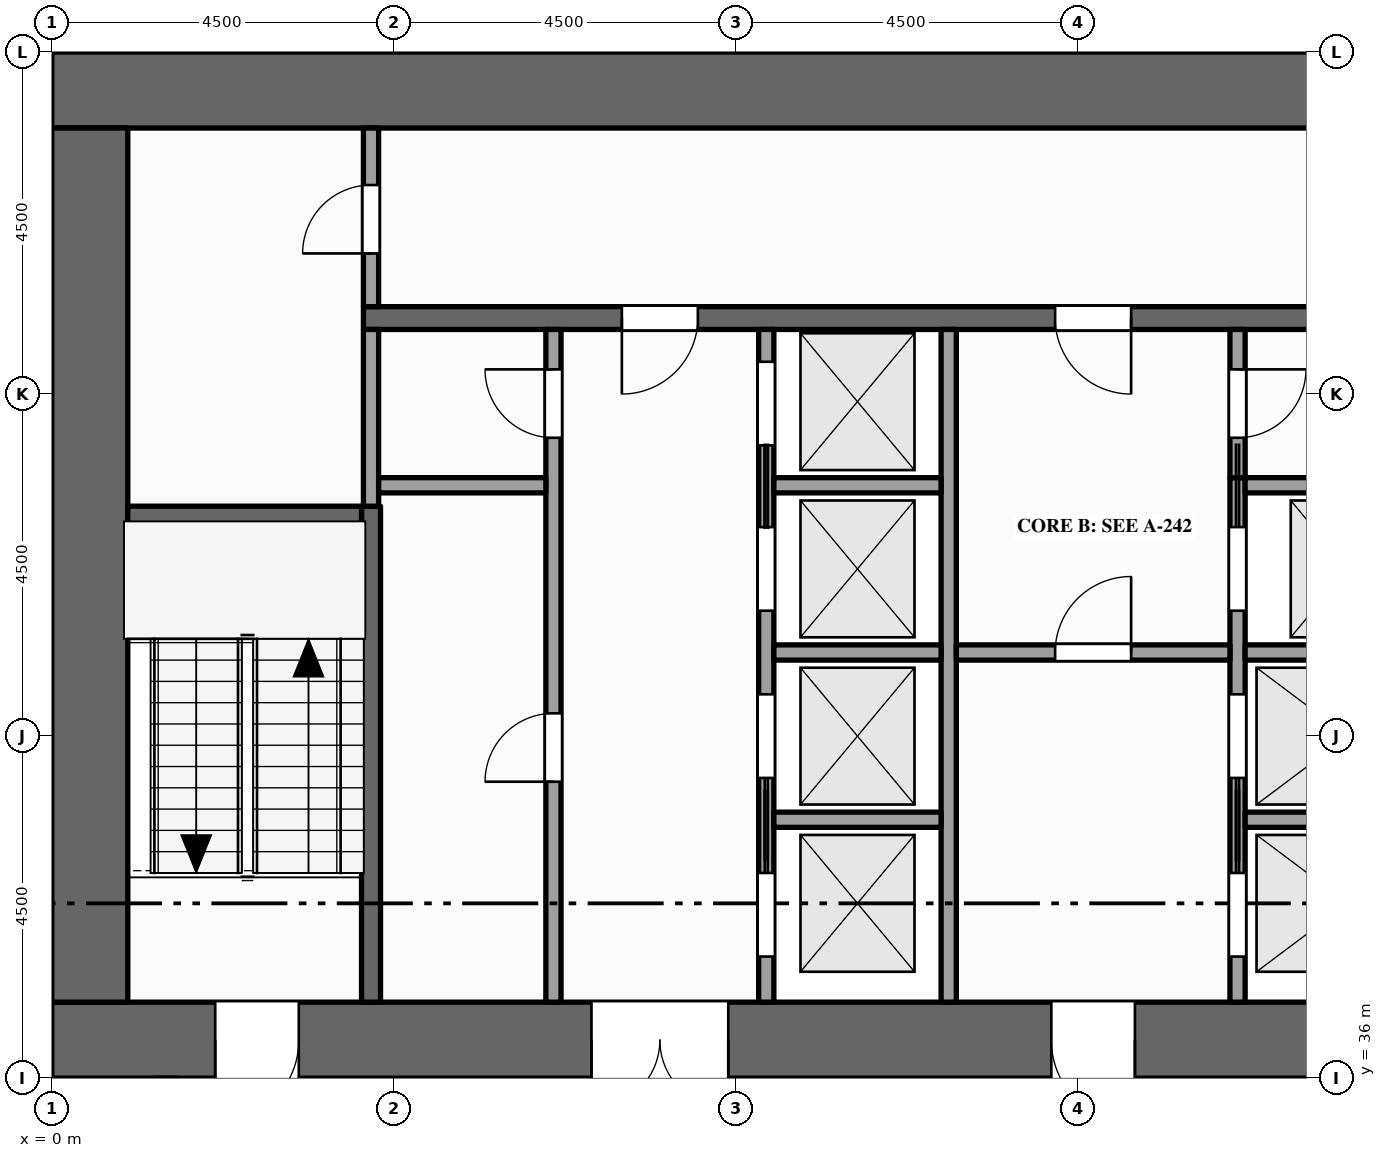
"""IFC4 building model, lengths in metres.
Left out: names, types, materials, properties, quantities, classifications, styles, units other than length and angle.
Written with IfcOpenShell. Run it as: python <this file> out.ifc"""

import sys

from ifc_helpers import new_model, si_unit, direction, frame, frame_2d, origin, place, context, subcontext, project, spatial, rectangle, extrude, element, fill, save


model = new_model("IFC4")
c1 = context("Model", 3, precision=1e-05, world=origin(), true_north=direction((0.0, 1.0)))
c2 = subcontext(c1, "Body", "Model", "MODEL_VIEW")
j1 = project(units=[si_unit("LENGTHUNIT", "METRE"), si_unit("PLANEANGLEUNIT", "RADIAN")], contexts=[c1])
p1 = place(None, origin())
s1 = spatial("IfcSite", under=j1, at=p1, CompositionType="ELEMENT")
p2 = place(p1, origin())
s2 = spatial("IfcBuilding", under=s1, at=p2, CompositionType="ELEMENT")
p3 = place(p2, frame((0.0, 0.0, 235.0)))
s3 = spatial("IfcBuildingStorey", under=s2, at=p3, CompositionType="ELEMENT", Elevation=235.0)
p4 = place(p3, frame((0.0, 36.5, -0.15), z_axis=(0.0, 0.0, 1.0), x_axis=(1.0, 0.0, 0.0)))
e1 = element("IfcWall", 1, at=p4, inside=s3, PredefinedType="SHEAR", context=c2, shape_type="SweptSolid", body=[
    extrude(rectangle(XDim=22.5, YDim=1.0, at=frame_2d((11.25, 0.0))), origin(), (0.0, 0.0, 1.0), 4.0),
])
p5 = place(p4, frame((7.1, 0.0, 0.15)))
e2 = element("IfcOpeningElement", 2, at=p5, cuts=e1, PredefinedType="OPENING", context=c2, shape_type="SweptSolid", body=[
    extrude(rectangle(XDim=1.8, YDim=2.1, at=frame_2d((0.9, 1.05))), frame((0.0, 0.51, 0.0), z_axis=(0.0, -1.0, 0.0), x_axis=(1.0, 0.0, 0.0)), (0.0, 0.0, 1.0), 1.02),
])
p6 = place(p4, frame((13.15, 0.0, 0.15)))
e3 = element("IfcOpeningElement", 3, at=p6, cuts=e1, PredefinedType="OPENING", context=c2, shape_type="SweptSolid", body=[
    extrude(rectangle(XDim=1.1, YDim=2.1, at=frame_2d((0.55, 1.05))), frame((0.0, 0.51, 0.0), z_axis=(0.0, -1.0, 0.0), x_axis=(1.0, 0.0, 0.0)), (0.0, 0.0, 1.0), 1.02),
])
p7 = place(p4, frame((2.15, 0.0, 0.15)))
e4 = element("IfcOpeningElement", 4, at=p7, cuts=e1, PredefinedType="OPENING", context=c2, shape_type="SweptSolid", body=[
    extrude(rectangle(XDim=1.1, YDim=2.1, at=frame_2d((0.55, 1.05))), frame((0.0, 0.51, 0.0), z_axis=(0.0, -1.0, 0.0), x_axis=(1.0, 0.0, 0.0)), (0.0, 0.0, 1.0), 1.02),
])
p8 = place(p4, frame((19.35, 0.0, 0.15)))
e5 = element("IfcOpeningElement", 5, at=p8, cuts=e1, PredefinedType="OPENING", context=c2, shape_type="SweptSolid", body=[
    extrude(rectangle(XDim=1.1, YDim=2.1, at=frame_2d((0.55, 1.05))), frame((0.0, 0.51, 0.0), z_axis=(0.0, -1.0, 0.0), x_axis=(1.0, 0.0, 0.0)), (0.0, 0.0, 1.0), 1.02),
])
p9 = place(p3, frame((0.0, 49.0, -0.15), z_axis=(0.0, 0.0, 1.0), x_axis=(1.0, 0.0, 0.0)))
e6 = element("IfcWall", 6, at=p9, inside=s3, PredefinedType="SHEAR", context=c2, shape_type="SweptSolid", body=[
    extrude(rectangle(XDim=22.5, YDim=1.0, at=frame_2d((11.25, 0.0))), origin(), (0.0, 0.0, 1.0), 4.0),
])
p10 = place(p3, frame((0.5, 37.0, -0.15), z_axis=(0.0, 0.0, 1.0), x_axis=(0.0, 1.0, 0.0)))
e7 = element("IfcWall", 7, at=p10, inside=s3, PredefinedType="SHEAR", context=c2, shape_type="SweptSolid", body=[
    extrude(rectangle(XDim=11.5, YDim=1.0, at=frame_2d((5.75, 0.0))), origin(), (0.0, 0.0, 1.0), 4.0),
])
p11 = place(p3, frame((4.2, 37.0, 0.0), z_axis=(0.0, 0.0, 1.0), x_axis=(0.0, 1.0, 0.0)))
e8 = element("IfcWall", 8, at=p11, inside=s3, PredefinedType="SHEAR", context=c2, shape_type="SweptSolid", body=[
    extrude(rectangle(XDim=6.525, YDim=0.25, at=frame_2d((3.262, 0.0))), origin(), (0.0, 0.0, 1.0), 3.85),
])
p12 = place(p3, frame((4.2, 43.525, 0.0), z_axis=(0.0, 0.0, 1.0), x_axis=(0.0, 1.0, 0.0)))
e9 = element("IfcWall", 9, at=p12, inside=s3, PredefinedType="PARTITIONING", context=c2, shape_type="SweptSolid", body=[
    extrude(rectangle(XDim=2.325, YDim=0.2, at=frame_2d((1.163, 0.0))), origin(), (0.0, 0.0, 1.0), 3.85),
])
p13 = place(p3, frame((4.2, 46.15, 0.0), z_axis=(0.0, 0.0, 1.0), x_axis=(0.0, 1.0, 0.0)))
e10 = element("IfcWall", 10, at=p13, inside=s3, PredefinedType="PARTITIONING", context=c2, shape_type="SweptSolid", body=[
    extrude(rectangle(XDim=2.35, YDim=0.2, at=frame_2d((1.175, 0.0))), origin(), (0.0, 0.0, 1.0), 3.85),
])
p14 = place(p13, frame((0.7, 0.0, 0.0)))
e11 = element("IfcOpeningElement", 11, at=p14, cuts=e10, PredefinedType="OPENING", context=c2, shape_type="SweptSolid", body=[
    extrude(rectangle(XDim=0.9, YDim=2.1, at=frame_2d((0.45, 1.05))), frame((0.0, 0.11, 0.0), z_axis=(0.0, -1.0, 0.0), x_axis=(1.0, 0.0, 0.0)), (0.0, 0.0, 1.0), 0.22),
])
p15 = place(p3, frame((6.6, 37.0, 0.0), z_axis=(0.0, 0.0, 1.0), x_axis=(0.0, 1.0, 0.0)))
e12 = element("IfcWall", 12, at=p15, inside=s3, PredefinedType="PARTITIONING", context=c2, shape_type="SweptSolid", body=[
    extrude(rectangle(XDim=8.85, YDim=0.2, at=frame_2d((4.425, 0.0))), origin(), (0.0, 0.0, 1.0), 3.85),
])
p16 = place(p15, frame((2.9, 0.0, 0.0)))
e13 = element("IfcOpeningElement", 13, at=p16, cuts=e12, PredefinedType="OPENING", context=c2, shape_type="SweptSolid", body=[
    extrude(rectangle(XDim=0.9, YDim=2.1, at=frame_2d((0.45, 1.05))), frame((0.0, 0.11, 0.0), z_axis=(0.0, -1.0, 0.0), x_axis=(1.0, 0.0, 0.0)), (0.0, 0.0, 1.0), 0.22),
])
p17 = place(p15, frame((7.425, 0.0, 0.0)))
e14 = element("IfcOpeningElement", 14, at=p17, cuts=e12, PredefinedType="OPENING", context=c2, shape_type="SweptSolid", body=[
    extrude(rectangle(XDim=0.9, YDim=2.1, at=frame_2d((0.45, 1.05))), frame((0.0, 0.11, 0.0), z_axis=(0.0, -1.0, 0.0), x_axis=(1.0, 0.0, 0.0)), (0.0, 0.0, 1.0), 0.22),
])
p18 = place(p3, frame((9.4, 37.0, 0.0), z_axis=(0.0, 0.0, 1.0), x_axis=(0.0, 1.0, 0.0)))
e15 = element("IfcWall", 15, at=p18, inside=s3, PredefinedType="SOLIDWALL", context=c2, shape_type="SweptSolid", body=[
    extrude(rectangle(XDim=8.85, YDim=0.2, at=frame_2d((4.425, 0.0))), origin(), (0.0, 0.0, 1.0), 3.85),
])
p19 = place(p18, frame((0.6, 0.0, 0.012)))
e16 = element("IfcOpeningElement", 16, at=p19, cuts=e15, PredefinedType="OPENING", context=c2, shape_type="SweptSolid", body=[
    extrude(rectangle(XDim=1.1, YDim=2.1, at=frame_2d((0.55, 1.05))), frame((0.0, 0.11, 0.0), z_axis=(0.0, -1.0, 0.0), x_axis=(1.0, 0.0, 0.0)), (0.0, 0.0, 1.0), 0.22),
])
p20 = place(p18, frame((2.95, 0.0, 0.012)))
e17 = element("IfcOpeningElement", 17, at=p20, cuts=e15, PredefinedType="OPENING", context=c2, shape_type="SweptSolid", body=[
    extrude(rectangle(XDim=1.1, YDim=2.1, at=frame_2d((0.55, 1.05))), frame((0.0, 0.11, 0.0), z_axis=(0.0, -1.0, 0.0), x_axis=(1.0, 0.0, 0.0)), (0.0, 0.0, 1.0), 0.22),
])
p21 = place(p18, frame((5.15, 0.0, 0.012)))
e18 = element("IfcOpeningElement", 18, at=p21, cuts=e15, PredefinedType="OPENING", context=c2, shape_type="SweptSolid", body=[
    extrude(rectangle(XDim=1.1, YDim=2.1, at=frame_2d((0.55, 1.05))), frame((0.0, 0.11, 0.0), z_axis=(0.0, -1.0, 0.0), x_axis=(1.0, 0.0, 0.0)), (0.0, 0.0, 1.0), 0.22),
])
p22 = place(p18, frame((7.325, 0.0, 0.012)))
e19 = element("IfcOpeningElement", 19, at=p22, cuts=e15, PredefinedType="OPENING", context=c2, shape_type="SweptSolid", body=[
    extrude(rectangle(XDim=1.1, YDim=2.1, at=frame_2d((0.55, 1.05))), frame((0.0, 0.11, 0.0), z_axis=(0.0, -1.0, 0.0), x_axis=(1.0, 0.0, 0.0)), (0.0, 0.0, 1.0), 0.22),
])
p23 = place(p3, frame((11.8, 37.0, 0.0), z_axis=(0.0, 0.0, 1.0), x_axis=(0.0, 1.0, 0.0)))
e20 = element("IfcWall", 20, at=p23, inside=s3, PredefinedType="SOLIDWALL", context=c2, shape_type="SweptSolid", body=[
    extrude(rectangle(XDim=8.85, YDim=0.2, at=frame_2d((4.425, 0.0))), origin(), (0.0, 0.0, 1.0), 3.85),
])
p24 = place(p3, frame((15.6, 37.0, 0.0), z_axis=(0.0, 0.0, 1.0), x_axis=(0.0, 1.0, 0.0)))
e21 = element("IfcWall", 21, at=p24, inside=s3, PredefinedType="SOLIDWALL", context=c2, shape_type="SweptSolid", body=[
    extrude(rectangle(XDim=6.9, YDim=0.2, at=frame_2d((3.45, 0.0))), origin(), (0.0, 0.0, 1.0), 3.85),
])
p25 = place(p24, frame((0.6, 0.0, 0.012)))
e22 = element("IfcOpeningElement", 22, at=p25, cuts=e21, PredefinedType="OPENING", context=c2, shape_type="SweptSolid", body=[
    extrude(rectangle(XDim=1.1, YDim=2.1, at=frame_2d((0.55, 1.05))), frame((0.0, 0.11, 0.0), z_axis=(0.0, -1.0, 0.0), x_axis=(1.0, 0.0, 0.0)), (0.0, 0.0, 1.0), 0.22),
])
p26 = place(p24, frame((2.95, 0.0, 0.012)))
e23 = element("IfcOpeningElement", 23, at=p26, cuts=e21, PredefinedType="OPENING", context=c2, shape_type="SweptSolid", body=[
    extrude(rectangle(XDim=1.1, YDim=2.1, at=frame_2d((0.55, 1.05))), frame((0.0, 0.11, 0.0), z_axis=(0.0, -1.0, 0.0), x_axis=(1.0, 0.0, 0.0)), (0.0, 0.0, 1.0), 0.22),
])
p27 = place(p24, frame((5.15, 0.0, 0.012)))
e24 = element("IfcOpeningElement", 24, at=p27, cuts=e21, PredefinedType="OPENING", context=c2, shape_type="SweptSolid", body=[
    extrude(rectangle(XDim=1.1, YDim=2.1, at=frame_2d((0.55, 1.05))), frame((0.0, 0.11, 0.0), z_axis=(0.0, -1.0, 0.0), x_axis=(1.0, 0.0, 0.0)), (0.0, 0.0, 1.0), 0.22),
])
p28 = place(p3, frame((15.6, 43.9, 0.0), z_axis=(0.0, 0.0, 1.0), x_axis=(0.0, 1.0, 0.0)))
e25 = element("IfcWall", 25, at=p28, inside=s3, PredefinedType="PARTITIONING", context=c2, shape_type="SweptSolid", body=[
    extrude(rectangle(XDim=1.95, YDim=0.2, at=frame_2d((0.975, 0.0))), origin(), (0.0, 0.0, 1.0), 3.85),
])
p29 = place(p28, frame((0.525, 0.0, 0.0)))
e26 = element("IfcOpeningElement", 26, at=p29, cuts=e25, PredefinedType="OPENING", context=c2, shape_type="SweptSolid", body=[
    extrude(rectangle(XDim=0.9, YDim=2.1, at=frame_2d((0.45, 1.05))), frame((0.0, 0.11, 0.0), z_axis=(0.0, -1.0, 0.0), x_axis=(1.0, 0.0, 0.0)), (0.0, 0.0, 1.0), 0.22),
])
p30 = place(p3, frame((9.5, 39.4, 0.0), z_axis=(0.0, 0.0, 1.0), x_axis=(1.0, 0.0, 0.0)))
e27 = element("IfcWall", 27, at=p30, inside=s3, PredefinedType="SOLIDWALL", context=c2, shape_type="SweptSolid", body=[
    extrude(rectangle(XDim=2.2, YDim=0.2, at=frame_2d((1.1, 0.0))), origin(), (0.0, 0.0, 1.0), 3.85),
])
p31 = place(p3, frame((15.7, 39.4, 0.0), z_axis=(0.0, 0.0, 1.0), x_axis=(1.0, 0.0, 0.0)))
e28 = element("IfcWall", 28, at=p31, inside=s3, PredefinedType="SOLIDWALL", context=c2, shape_type="SweptSolid", body=[
    extrude(rectangle(XDim=2.675, YDim=0.2, at=frame_2d((1.337, 0.0))), origin(), (0.0, 0.0, 1.0), 3.85),
])
p32 = place(p3, frame((9.5, 41.6, 0.0), z_axis=(0.0, 0.0, 1.0), x_axis=(1.0, 0.0, 0.0)))
e29 = element("IfcWall", 29, at=p32, inside=s3, PredefinedType="SOLIDWALL", context=c2, shape_type="SweptSolid", body=[
    extrude(rectangle(XDim=2.2, YDim=0.2, at=frame_2d((1.1, 0.0))), origin(), (0.0, 0.0, 1.0), 3.85),
])
p33 = place(p3, frame((11.9, 41.6, 0.0), z_axis=(0.0, 0.0, 1.0), x_axis=(1.0, 0.0, 0.0)))
e30 = element("IfcWall", 30, at=p33, inside=s3, PredefinedType="PARTITIONING", context=c2, shape_type="SweptSolid", body=[
    extrude(rectangle(XDim=3.6, YDim=0.2, at=frame_2d((1.8, 0.0))), origin(), (0.0, 0.0, 1.0), 3.85),
])
p34 = place(p33, frame((1.3, 0.0, 0.0)))
e31 = element("IfcOpeningElement", 31, at=p34, cuts=e30, PredefinedType="OPENING", context=c2, shape_type="SweptSolid", body=[
    extrude(rectangle(XDim=1.0, YDim=2.1, at=frame_2d((0.5, 1.05))), frame((0.0, 0.11, 0.0), z_axis=(0.0, -1.0, 0.0), x_axis=(1.0, 0.0, 0.0)), (0.0, 0.0, 1.0), 0.22),
])
p35 = place(p3, frame((15.7, 41.6, 0.0), z_axis=(0.0, 0.0, 1.0), x_axis=(1.0, 0.0, 0.0)))
e32 = element("IfcWall", 32, at=p35, inside=s3, PredefinedType="SOLIDWALL", context=c2, shape_type="SweptSolid", body=[
    extrude(rectangle(XDim=2.675, YDim=0.2, at=frame_2d((1.337, 0.0))), origin(), (0.0, 0.0, 1.0), 3.85),
])
p36 = place(p3, frame((1.0, 43.4, 0.0), z_axis=(0.0, 0.0, 1.0), x_axis=(1.0, 0.0, 0.0)))
e33 = element("IfcWall", 33, at=p36, inside=s3, PredefinedType="SHEAR", context=c2, shape_type="SweptSolid", body=[
    extrude(rectangle(XDim=3.075, YDim=0.25, at=frame_2d((1.538, 0.0))), origin(), (0.0, 0.0, 1.0), 3.85),
])
p37 = place(p3, frame((4.3, 43.8, 0.0), z_axis=(0.0, 0.0, 1.0), x_axis=(1.0, 0.0, 0.0)))
e34 = element("IfcWall", 34, at=p37, inside=s3, PredefinedType="PARTITIONING", context=c2, shape_type="SweptSolid", body=[
    extrude(rectangle(XDim=2.2, YDim=0.2, at=frame_2d((1.1, 0.0))), origin(), (0.0, 0.0, 1.0), 3.85),
])
p38 = place(p3, frame((9.5, 43.8, 0.0), z_axis=(0.0, 0.0, 1.0), x_axis=(1.0, 0.0, 0.0)))
e35 = element("IfcWall", 35, at=p38, inside=s3, PredefinedType="SOLIDWALL", context=c2, shape_type="SweptSolid", body=[
    extrude(rectangle(XDim=2.2, YDim=0.2, at=frame_2d((1.1, 0.0))), origin(), (0.0, 0.0, 1.0), 3.85),
])
p39 = place(p3, frame((15.7, 43.8, 0.0), z_axis=(0.0, 0.0, 1.0), x_axis=(1.0, 0.0, 0.0)))
e36 = element("IfcWall", 36, at=p39, inside=s3, PredefinedType="SOLIDWALL", context=c2, shape_type="SweptSolid", body=[
    extrude(rectangle(XDim=2.7, YDim=0.2, at=frame_2d((1.35, 0.0))), origin(), (0.0, 0.0, 1.0), 3.85),
])
p40 = place(p3, frame((4.1, 46.0, 0.0), z_axis=(0.0, 0.0, 1.0), x_axis=(1.0, 0.0, 0.0)))
e37 = element("IfcWall", 37, at=p40, inside=s3, PredefinedType="SHEAR", context=c2, shape_type="SweptSolid", body=[
    extrude(rectangle(XDim=14.5, YDim=0.3, at=frame_2d((7.25, 0.0))), origin(), (0.0, 0.0, 1.0), 3.85),
])
p41 = place(p40, frame((3.4, 0.0, 0.0)))
e38 = element("IfcOpeningElement", 38, at=p41, cuts=e37, PredefinedType="OPENING", context=c2, shape_type="SweptSolid", body=[
    extrude(rectangle(XDim=1.0, YDim=2.1, at=frame_2d((0.5, 1.05))), frame((0.0, 0.16, 0.0), z_axis=(0.0, -1.0, 0.0), x_axis=(1.0, 0.0, 0.0)), (0.0, 0.0, 1.0), 0.32),
])
p42 = place(p40, frame((9.1, 0.0, 0.0)))
e39 = element("IfcOpeningElement", 39, at=p42, cuts=e37, PredefinedType="OPENING", context=c2, shape_type="SweptSolid", body=[
    extrude(rectangle(XDim=1.0, YDim=2.1, at=frame_2d((0.5, 1.05))), frame((0.0, 0.16, 0.0), z_axis=(0.0, -1.0, 0.0), x_axis=(1.0, 0.0, 0.0)), (0.0, 0.0, 1.0), 0.32),
])
p43 = place(p19, origin())
e40 = element("IfcDoor", 40, at=p43, inside=s3, OperationType="SLIDING_TO_RIGHT", PredefinedType="DOOR", context=c2, shape_type="SweptSolid", body=[
    extrude(rectangle(XDim=1.1, YDim=2.1, at=frame_2d((0.55, 1.05))), frame((0.0, 0.025, 0.0), z_axis=(0.0, -1.0, 0.0), x_axis=(1.0, 0.0, 0.0)), (0.0, 0.0, 1.0), 0.05),
])
fill(e16, e40)
p44 = place(p20, origin())
e41 = element("IfcDoor", 41, at=p44, inside=s3, OperationType="SLIDING_TO_LEFT", PredefinedType="DOOR", context=c2, shape_type="SweptSolid", body=[
    extrude(rectangle(XDim=1.1, YDim=2.1, at=frame_2d((0.55, 1.05))), frame((0.0, 0.025, 0.0), z_axis=(0.0, -1.0, 0.0), x_axis=(1.0, 0.0, 0.0)), (0.0, 0.0, 1.0), 0.05),
])
fill(e17, e41)
p45 = place(p21, origin())
e42 = element("IfcDoor", 42, at=p45, inside=s3, OperationType="SLIDING_TO_RIGHT", PredefinedType="DOOR", context=c2, shape_type="SweptSolid", body=[
    extrude(rectangle(XDim=1.1, YDim=2.1, at=frame_2d((0.55, 1.05))), frame((0.0, 0.025, 0.0), z_axis=(0.0, -1.0, 0.0), x_axis=(1.0, 0.0, 0.0)), (0.0, 0.0, 1.0), 0.05),
])
fill(e18, e42)
p46 = place(p22, origin())
e43 = element("IfcDoor", 43, at=p46, inside=s3, OperationType="SLIDING_TO_LEFT", PredefinedType="DOOR", context=c2, shape_type="SweptSolid", body=[
    extrude(rectangle(XDim=1.1, YDim=2.1, at=frame_2d((0.55, 1.05))), frame((0.0, 0.025, 0.0), z_axis=(0.0, -1.0, 0.0), x_axis=(1.0, 0.0, 0.0)), (0.0, 0.0, 1.0), 0.05),
])
fill(e19, e43)
p47 = place(p25, origin())
e44 = element("IfcDoor", 44, at=p47, inside=s3, OperationType="SLIDING_TO_RIGHT", PredefinedType="DOOR", context=c2, shape_type="SweptSolid", body=[
    extrude(rectangle(XDim=1.1, YDim=2.1, at=frame_2d((0.55, 1.05))), frame((0.0, 0.025, 0.0), z_axis=(0.0, -1.0, 0.0), x_axis=(1.0, 0.0, 0.0)), (0.0, 0.0, 1.0), 0.05),
])
fill(e22, e44)
p48 = place(p26, origin())
e45 = element("IfcDoor", 45, at=p48, inside=s3, OperationType="SLIDING_TO_LEFT", PredefinedType="DOOR", context=c2, shape_type="SweptSolid", body=[
    extrude(rectangle(XDim=1.1, YDim=2.1, at=frame_2d((0.55, 1.05))), frame((0.0, 0.025, 0.0), z_axis=(0.0, -1.0, 0.0), x_axis=(1.0, 0.0, 0.0)), (0.0, 0.0, 1.0), 0.05),
])
fill(e23, e45)
p49 = place(p27, origin())
e46 = element("IfcDoor", 46, at=p49, inside=s3, OperationType="SLIDING_TO_RIGHT", PredefinedType="DOOR", context=c2, shape_type="SweptSolid", body=[
    extrude(rectangle(XDim=1.1, YDim=2.1, at=frame_2d((0.55, 1.05))), frame((0.0, 0.025, 0.0), z_axis=(0.0, -1.0, 0.0), x_axis=(1.0, 0.0, 0.0)), (0.0, 0.0, 1.0), 0.05),
])
fill(e24, e46)
p50 = place(p5, origin())
e47 = element("IfcDoor", 47, at=p50, inside=s3, OperationType="DOUBLE_DOOR_SINGLE_SWING", PredefinedType="DOOR", context=c2, shape_type="SweptSolid", body=[
    extrude(rectangle(XDim=1.8, YDim=2.1, at=frame_2d((0.9, 1.05))), frame((0.0, 0.025, 0.0), z_axis=(0.0, -1.0, 0.0), x_axis=(1.0, 0.0, 0.0)), (0.0, 0.0, 1.0), 0.05),
])
fill(e2, e47)
p51 = place(p41, origin())
e48 = element("IfcDoor", 48, at=p51, inside=s3, OperationType="SINGLE_SWING_LEFT", PredefinedType="DOOR", context=c2, shape_type="SweptSolid", body=[
    extrude(rectangle(XDim=1.0, YDim=2.1, at=frame_2d((0.5, 1.05))), frame((0.0, 0.025, 0.0), z_axis=(0.0, -1.0, 0.0), x_axis=(1.0, 0.0, 0.0)), (0.0, 0.0, 1.0), 0.05),
])
fill(e38, e48)
p52 = place(p6, origin())
e49 = element("IfcDoor", 49, at=p52, inside=s3, OperationType="SINGLE_SWING_RIGHT", PredefinedType="DOOR", context=c2, shape_type="SweptSolid", body=[
    extrude(rectangle(XDim=1.1, YDim=2.1, at=frame_2d((0.55, 1.05))), frame((0.0, 0.025, 0.0), z_axis=(0.0, -1.0, 0.0), x_axis=(1.0, 0.0, 0.0)), (0.0, 0.0, 1.0), 0.05),
])
fill(e3, e49)
p53 = place(p34, origin())
e50 = element("IfcDoor", 50, at=p53, inside=s3, OperationType="SINGLE_SWING_RIGHT", PredefinedType="DOOR", context=c2, shape_type="SweptSolid", body=[
    extrude(rectangle(XDim=1.0, YDim=2.1, at=frame_2d((0.5, 1.05))), frame((0.0, 0.025, 0.0), z_axis=(0.0, -1.0, 0.0), x_axis=(1.0, 0.0, 0.0)), (0.0, 0.0, 1.0), 0.05),
])
fill(e31, e50)
p54 = place(p42, origin())
e51 = element("IfcDoor", 51, at=p54, inside=s3, OperationType="SINGLE_SWING_RIGHT", PredefinedType="DOOR", context=c2, shape_type="SweptSolid", body=[
    extrude(rectangle(XDim=1.0, YDim=2.1, at=frame_2d((0.5, 1.05))), frame((0.0, 0.025, 0.0), z_axis=(0.0, -1.0, 0.0), x_axis=(1.0, 0.0, 0.0)), (0.0, 0.0, 1.0), 0.05),
])
fill(e39, e51)
p55 = place(p7, origin())
e52 = element("IfcDoor", 52, at=p55, inside=s3, OperationType="SINGLE_SWING_LEFT", PredefinedType="DOOR", context=c2, shape_type="SweptSolid", body=[
    extrude(rectangle(XDim=1.1, YDim=2.1, at=frame_2d((0.55, 1.05))), frame((0.0, 0.025, 0.0), z_axis=(0.0, -1.0, 0.0), x_axis=(1.0, 0.0, 0.0)), (0.0, 0.0, 1.0), 0.05),
])
fill(e4, e52)
p56 = place(p14, origin())
e53 = element("IfcDoor", 53, at=p56, inside=s3, OperationType="SINGLE_SWING_LEFT", PredefinedType="DOOR", context=c2, shape_type="SweptSolid", body=[
    extrude(rectangle(XDim=0.9, YDim=2.1, at=frame_2d((0.45, 1.05))), frame((0.0, 0.025, 0.0), z_axis=(0.0, -1.0, 0.0), x_axis=(1.0, 0.0, 0.0)), (0.0, 0.0, 1.0), 0.05),
])
fill(e11, e53)
p57 = place(p16, origin())
e54 = element("IfcDoor", 54, at=p57, inside=s3, OperationType="SINGLE_SWING_LEFT", PredefinedType="DOOR", context=c2, shape_type="SweptSolid", body=[
    extrude(rectangle(XDim=0.9, YDim=2.1, at=frame_2d((0.45, 1.05))), frame((0.0, 0.025, 0.0), z_axis=(0.0, -1.0, 0.0), x_axis=(1.0, 0.0, 0.0)), (0.0, 0.0, 1.0), 0.05),
])
fill(e13, e54)
p58 = place(p17, origin())
e55 = element("IfcDoor", 55, at=p58, inside=s3, OperationType="SINGLE_SWING_RIGHT", PredefinedType="DOOR", context=c2, shape_type="SweptSolid", body=[
    extrude(rectangle(XDim=0.9, YDim=2.1, at=frame_2d((0.45, 1.05))), frame((0.0, 0.025, 0.0), z_axis=(0.0, -1.0, 0.0), x_axis=(1.0, 0.0, 0.0)), (0.0, 0.0, 1.0), 0.05),
])
fill(e14, e55)
p59 = place(p29, origin())
e56 = element("IfcDoor", 56, at=p59, inside=s3, OperationType="SINGLE_SWING_RIGHT", PredefinedType="DOOR", context=c2, shape_type="SweptSolid", body=[
    extrude(rectangle(XDim=0.9, YDim=2.1, at=frame_2d((0.45, 1.05))), frame((0.0, 0.025, 0.0), z_axis=(0.0, -1.0, 0.0), x_axis=(1.0, 0.0, 0.0)), (0.0, 0.0, 1.0), 0.05),
])
fill(e26, e56)
save(model, sys.argv[1])
